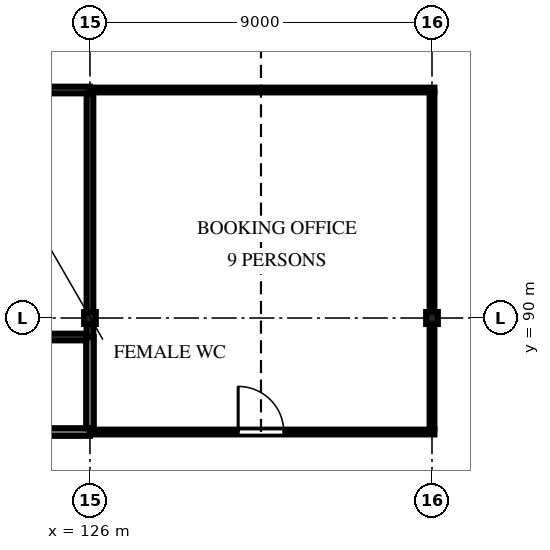
"""IFC4 building model, lengths in metres.
Left out: names, types, materials, properties, quantities, classifications, styles, units other than length and angle.
Written with IfcOpenShell. Run it as: python <this file> out.ifc"""

import sys

from ifc_helpers import new_model, si_unit, direction, frame, frame_2d, origin, origin_2d, place, context, subcontext, project, spatial, polyline, rectangle, i_section, outline, extrude, element, fill, save


model = new_model("IFC4")
c1 = context("Model", 3, precision=1e-05, world=origin(), true_north=direction((0.0, 1.0)))
c2 = subcontext(c1, "Body", "Model", "MODEL_VIEW")
j1 = project(units=[si_unit("LENGTHUNIT", "METRE"), si_unit("PLANEANGLEUNIT", "RADIAN")], contexts=[c1])
p1 = place(None, origin())
s1 = spatial("IfcSite", under=j1, at=p1, CompositionType="ELEMENT")
p2 = place(p1, origin())
s2 = spatial("IfcBuilding", under=s1, at=p2, CompositionType="ELEMENT")
p3 = place(p2, origin())
s3 = spatial("IfcBuildingStorey", under=s2, at=p3, CompositionType="ELEMENT", Elevation=0.0)
for number, where, z_axis, x_axis in (
    (1, (126.0, 90.0, -2.1), (0.0, 0.0, 1.0), (1.0, 0.0, 0.0)),
    (2, (135.0, 90.0, -2.1), (0.0, 0.0, 1.0), (1.0, 0.0, 0.0)),
):
    element("IfcColumn", number, at=place(p3, frame(where, z_axis=z_axis, x_axis=x_axis)), inside=s3, PredefinedType="COLUMN", context=c2, shape_type="SweptSolid", body=[
        extrude(i_section(OverallWidth=0.307, OverallDepth=0.314, WebThickness=0.012, FlangeThickness=0.019, FilletRadius=0.015, at=origin_2d()), origin(), (0.0, 0.0, 1.0), 9.6),
    ])
p4 = place(p3, frame((135.062, 96.0, 0.0), z_axis=(0.0, 0.0, 1.0), x_axis=(-1.0, 0.0, 0.0)))
e3 = element("IfcWall", 3, at=p4, inside=s3, PredefinedType="PARTITIONING", context=c2, shape_type="SweptSolid", body=[
    extrude(rectangle(XDim=9.062, YDim=0.125, at=frame_2d((4.531, 0.0))), origin(), (0.0, 0.0, 1.0), 6.757),
])
p5 = place(p3, frame((126.0, 96.0, 0.0), z_axis=(0.0, 0.0, 1.0), x_axis=(-1.0, 0.0, 0.0)))
e4 = element("IfcWall", 4, at=p5, inside=s3, PredefinedType="PARTITIONING", context=c2, shape_type="SweptSolid", body=[
    extrude(rectangle(XDim=3.15, YDim=0.175, at=frame_2d((1.575, 0.0))), origin(), (0.0, 0.0, 1.0), 6.459),
])
p6 = place(p3, frame((117.0, 87.0, 0.0), z_axis=(0.0, 0.0, 1.0), x_axis=(1.0, 0.0, 0.0)))
e5 = element("IfcWall", 5, at=p6, inside=s3, PredefinedType="PARTITIONING", context=c2, shape_type="SweptSolid", body=[
    extrude(rectangle(XDim=9.0, YDim=0.2, at=frame_2d((4.5, 0.0))), origin(), (0.0, 0.0, 1.0), 6.6),
])
p7 = place(p6, frame((3.9, 0.0, 0.0)))
e6 = element("IfcOpeningElement", 6, at=p7, cuts=e5, PredefinedType="OPENING", context=c2, shape_type="SweptSolid", body=[
    extrude(rectangle(XDim=1.2, YDim=2.1, at=frame_2d((0.6, 1.05))), frame((0.0, 0.11, 0.0), z_axis=(0.0, -1.0, 0.0), x_axis=(1.0, 0.0, 0.0)), (0.0, 0.0, 1.0), 0.22),
])
p8 = place(p3, frame((126.0, 87.0, 0.0), z_axis=(0.0, 0.0, 1.0), x_axis=(1.0, 0.0, 0.0)))
e7 = element("IfcWall", 7, at=p8, inside=s3, PredefinedType="PARTITIONING", context=c2, shape_type="SweptSolid", body=[
    extrude(rectangle(XDim=9.062, YDim=0.125, at=frame_2d((4.531, 0.0))), origin(), (0.0, 0.0, 1.0), 6.757),
])
p9 = place(p8, frame((3.9, 0.0, 0.0)))
e8 = element("IfcOpeningElement", 8, at=p9, cuts=e7, PredefinedType="OPENING", context=c2, shape_type="SweptSolid", body=[
    extrude(rectangle(XDim=1.2, YDim=2.1, at=frame_2d((0.6, 1.05))), frame((0.0, 0.073, 0.0), z_axis=(0.0, -1.0, 0.0), x_axis=(1.0, 0.0, 0.0)), (0.0, 0.0, 1.0), 0.145),
])
p10 = place(p3, frame((135.0, 90.157, 0.0), z_axis=(0.0, 0.0, 1.0), x_axis=(0.0, 1.0, 0.0)))
e9 = element("IfcWall", 9, at=p10, inside=s3, PredefinedType="PARTITIONING", context=c2, shape_type="SweptSolid", body=[
    extrude(rectangle(XDim=5.78, YDim=0.125, at=frame_2d((2.89, 0.0))), origin(), (0.0, 0.0, 1.0), 6.757),
])
p11 = place(p3, frame((135.0, 87.062, 0.0), z_axis=(0.0, 0.0, 1.0), x_axis=(0.0, 1.0, 0.0)))
e10 = element("IfcWall", 10, at=p11, inside=s3, PredefinedType="PARTITIONING", context=c2, shape_type="SweptSolid", body=[
    extrude(rectangle(XDim=2.78, YDim=0.125, at=frame_2d((1.39, 0.0))), origin(), (0.0, 0.0, 1.0), 6.757),
])
p12 = place(p3, frame((126.0, 89.5, 0.0), z_axis=(0.0, 0.0, 1.0), x_axis=(0.0, -1.0, 0.0)))
e11 = element("IfcWall", 11, at=p12, inside=s3, PredefinedType="PARTITIONING", context=c2, shape_type="SweptSolid", body=[
    extrude(rectangle(XDim=2.4, YDim=0.2, at=frame_2d((1.2, 0.0))), origin(), (0.0, 0.0, 1.0), 6.6),
])
p13 = place(p3, frame((122.85, 89.5, 0.0), z_axis=(0.0, 0.0, 1.0), x_axis=(1.0, 0.0, 0.0)))
e12 = element("IfcWall", 12, at=p13, inside=s3, PredefinedType="PARTITIONING", context=c2, shape_type="SweptSolid", body=[
    extrude(rectangle(XDim=3.05, YDim=0.175, at=frame_2d((1.525, 0.0))), origin(), (0.0, 0.0, 1.0), 6.459),
])
p14 = place(p13, frame((1.125, 0.0, 0.0)))
e13 = element("IfcOpeningElement", 13, at=p14, cuts=e12, PredefinedType="OPENING", context=c2, shape_type="SweptSolid", body=[
    extrude(rectangle(XDim=0.9, YDim=2.1, at=frame_2d((0.45, 1.05))), frame((0.0, 0.097, 0.0), z_axis=(0.0, -1.0, 0.0), x_axis=(1.0, 0.0, 0.0)), (0.0, 0.0, 1.0), 0.195),
])
p15 = place(p3, frame((126.0, 95.913, 0.0), z_axis=(0.0, 0.0, 1.0), x_axis=(0.0, -1.0, 0.0)))
e14 = element("IfcWall", 14, at=p15, inside=s3, PredefinedType="PARTITIONING", context=c2, shape_type="SweptSolid", body=[
    extrude(rectangle(XDim=5.755, YDim=0.175, at=frame_2d((2.878, 0.0))), origin(), (0.0, 0.0, 1.0), 6.459),
])
p16 = place(p3, frame((126.0, 89.843, 0.0), z_axis=(0.0, 0.0, 1.0), x_axis=(0.0, -1.0, 0.0)))
e15 = element("IfcWall", 15, at=p16, inside=s3, PredefinedType="PARTITIONING", context=c2, shape_type="SweptSolid", body=[
    extrude(rectangle(XDim=0.343, YDim=0.175, at=frame_2d((0.171, 0.0))), origin(), (0.0, 0.0, 1.0), 6.459),
])
p17 = place(p9, origin())
e16 = element("IfcDoor", 16, at=p17, inside=s3, OperationType="DOUBLE_DOOR_SINGLE_SWING", PredefinedType="DOOR", context=c2, shape_type="SweptSolid", body=[
    extrude(outline(polyline([(0.0, 0.0), (0.07, 0.0), (0.07, 2.03), (1.13, 2.03), (1.13, 0.0), (1.2, 0.0), (1.2, 2.1), (0.0, 2.1), (0.0, 0.0)])), frame((0.0, 0.025, 0.0), z_axis=(0.0, -1.0, 0.0), x_axis=(1.0, 0.0, 0.0)), (0.0, 0.0, 1.0), 0.05),
    extrude(outline(polyline([(0.074, 0.01), (0.597, 0.01), (0.597, 2.026), (0.074, 2.026), (0.074, 0.01)]), holes=[polyline([(0.178, 0.373), (0.492, 0.373), (0.492, 1.784), (0.178, 1.784), (0.178, 0.373)])]), frame((0.0, 0.017, 0.0), z_axis=(0.0, -1.0, 0.0), x_axis=(1.0, 0.0, 0.0)), (0.0, 0.0, 1.0), 0.035),
    extrude(rectangle(XDim=0.314, YDim=1.411, at=frame_2d((0.335, 1.079))), frame((0.0, 0.009, 0.0), z_axis=(0.0, -1.0, 0.0), x_axis=(1.0, 0.0, 0.0)), (0.0, 0.0, 1.0), 0.017),
    extrude(outline(polyline([(0.603, 0.01), (1.126, 0.01), (1.126, 2.026), (0.603, 2.026), (0.603, 0.01)]), holes=[polyline([(0.708, 0.373), (1.021, 0.373), (1.021, 1.784), (0.708, 1.784), (0.708, 0.373)])]), frame((0.0, 0.017, 0.0), z_axis=(0.0, -1.0, 0.0), x_axis=(1.0, 0.0, 0.0)), (0.0, 0.0, 1.0), 0.035),
    extrude(rectangle(XDim=0.314, YDim=1.411, at=frame_2d((0.865, 1.079))), frame((0.0, 0.009, 0.0), z_axis=(0.0, -1.0, 0.0), x_axis=(1.0, 0.0, 0.0)), (0.0, 0.0, 1.0), 0.017),
])
fill(e8, e16)
save(model, sys.argv[1])
